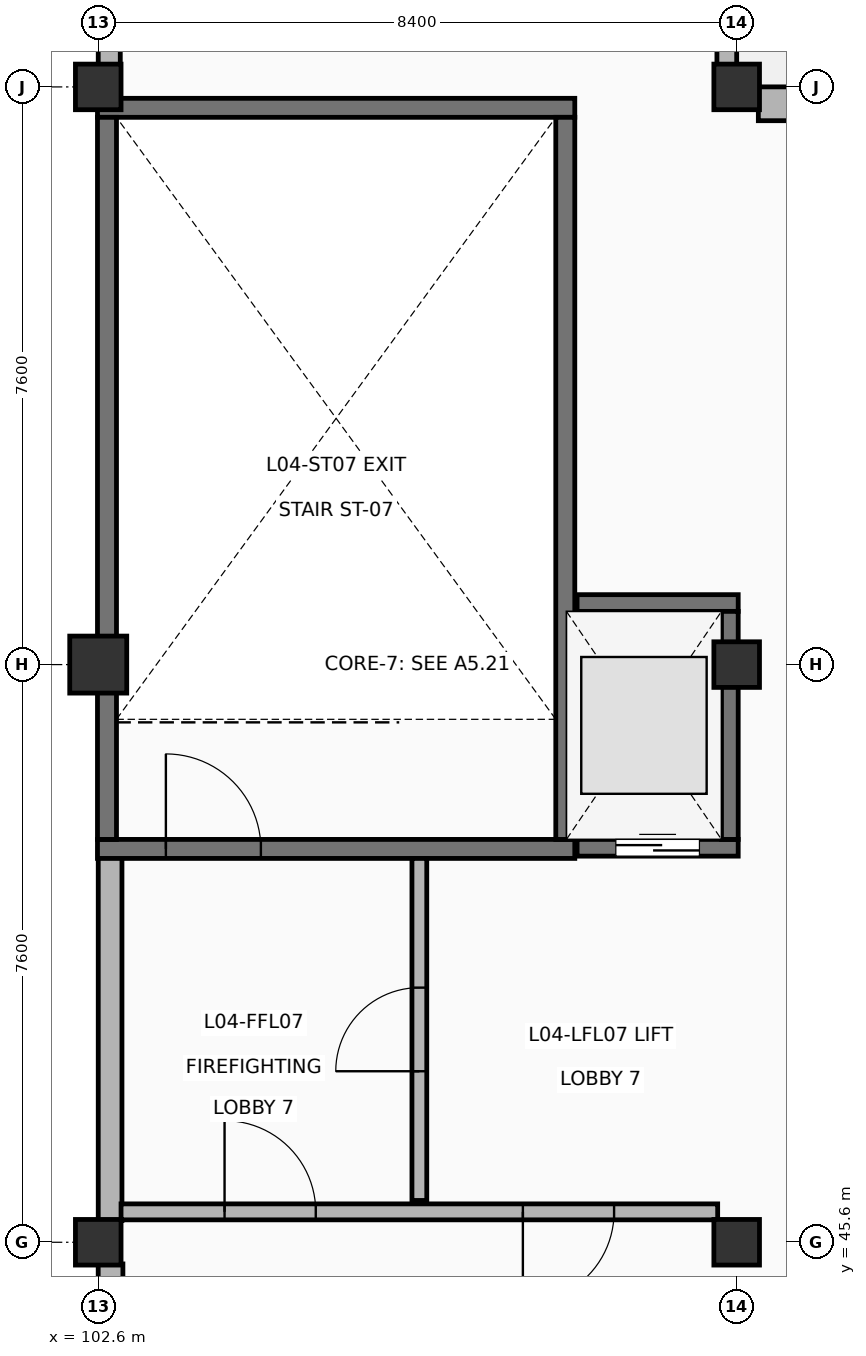
"""IFC4 building model, lengths in metres.
Left out: names, types, materials, properties, quantities, classifications, styles, units other than length and angle.
Written with IfcOpenShell. Run it as: python <this file> out.ifc"""

import sys

from ifc_helpers import new_model, si_unit, direction, frame, frame_2d, origin, origin_2d, place, context, subcontext, project, spatial, rectangle, circle, extrude, element, fill, save


model = new_model("IFC4")
c1 = context("Model", 3, precision=1e-05, world=origin(), true_north=direction((0.0, 1.0)))
c2 = subcontext(c1, "Body", "Model", "MODEL_VIEW")
j1 = project(units=[si_unit("LENGTHUNIT", "METRE"), si_unit("PLANEANGLEUNIT", "RADIAN")], contexts=[c1])
p1 = place(None, origin())
s1 = spatial("IfcSite", under=j1, at=p1, CompositionType="ELEMENT")
p2 = place(p1, origin())
s2 = spatial("IfcBuilding", under=s1, at=p2, CompositionType="ELEMENT")
p3 = place(p2, frame((0.0, 0.0, 15.3)))
s3 = spatial("IfcBuildingStorey", under=s2, at=p3, CompositionType="ELEMENT", Elevation=15.3)
p4 = place(p3, frame((102.6, 45.6, 0.0), z_axis=(0.0, 0.0, 1.0), x_axis=(1.0, 0.0, 0.0)))
e1 = element("IfcColumn", 1, at=p4, inside=s3, PredefinedType="COLUMN", context=c2, shape_type="SweptSolid", body=[
    extrude(rectangle(XDim=0.6, YDim=0.6, at=origin_2d()), origin(), (0.0, 0.0, 1.0), 4.285),
])
p5 = place(p3, frame((102.6, 53.2, 0.0), z_axis=(0.0, 0.0, 1.0), x_axis=(1.0, 0.0, 0.0)))
e2 = element("IfcColumn", 2, at=p5, inside=s3, PredefinedType="COLUMN", context=c2, shape_type="SweptSolid", body=[
    extrude(circle(Radius=0.375, at=origin_2d()), origin(), (0.0, 0.0, 1.0), 4.285),
])
for number, where, z_axis, x_axis in (
    (3, (102.6, 60.8, 0.0), (0.0, 0.0, 1.0), (1.0, 0.0, 0.0)),
    (4, (111.0, 45.6, 0.0), (0.0, 0.0, 1.0), (1.0, 0.0, 0.0)),
    (5, (111.0, 53.2, 0.0), (0.0, 0.0, 1.0), (1.0, 0.0, 0.0)),
    (6, (111.0, 60.8, 0.0), (0.0, 0.0, 1.0), (1.0, 0.0, 0.0)),
):
    element("IfcColumn", number, at=place(p3, frame(where, z_axis=z_axis, x_axis=x_axis)), inside=s3, PredefinedType="COLUMN", context=c2, shape_type="SweptSolid", body=[
        extrude(rectangle(XDim=0.6, YDim=0.6, at=origin_2d()), origin(), (0.0, 0.0, 1.0), 4.285),
    ])
p6 = place(p3, frame((102.762, 38.345, 0.0), z_axis=(0.0, 0.0, 1.0), x_axis=(0.0, 1.0, 0.0)))
e7 = element("IfcWall", 7, at=p6, inside=s3, PredefinedType="SOLIDWALL", context=c2, shape_type="SweptSolid", body=[
    extrude(rectangle(XDim=6.97, YDim=0.325, at=frame_2d((3.485, 0.0))), origin(), (0.0, 0.0, 1.0), 4.26),
])
p7 = place(p3, frame((102.756, 45.885, 0.0), z_axis=(0.0, 0.0, 1.0), x_axis=(0.0, 1.0, 0.0)))
e8 = element("IfcWall", 8, at=p7, inside=s3, PredefinedType="SOLIDWALL", context=c2, shape_type="SweptSolid", body=[
    extrude(rectangle(XDim=4.895, YDim=0.312, at=frame_2d((2.448, 0.0))), origin(), (0.0, 0.0, 1.0), 4.26),
])
p8 = place(p3, frame((102.745, 61.085, 0.0), z_axis=(0.0, 0.0, 1.0), x_axis=(0.0, 1.0, 0.0)))
e9 = element("IfcWall", 9, at=p8, inside=s3, PredefinedType="SOLIDWALL", context=c2, shape_type="SweptSolid", body=[
    extrude(rectangle(XDim=7.03, YDim=0.29, at=frame_2d((3.515, 0.0))), origin(), (0.0, 0.0, 1.0), 4.26),
])
p9 = place(p3, frame((110.87, 68.115, 0.0), z_axis=(0.0, 0.0, 1.0), x_axis=(0.0, -1.0, 0.0)))
e10 = element("IfcWall", 10, at=p9, inside=s3, PredefinedType="SOLIDWALL", context=c2, shape_type="SweptSolid", body=[
    extrude(rectangle(XDim=7.03, YDim=0.26, at=frame_2d((3.515, 0.0))), origin(), (0.0, 0.0, 1.0), 4.26),
])
p10 = place(p9, frame((2.615, 0.0, 0.0)))
e11 = element("IfcOpeningElement", 11, at=p10, cuts=e10, PredefinedType="OPENING", context=c2, shape_type="SweptSolid", body=[
    extrude(rectangle(XDim=1.8, YDim=2.3, at=frame_2d((0.9, 1.15))), frame((0.0, 0.14, 0.0), z_axis=(0.0, -1.0, 0.0), x_axis=(1.0, 0.0, 0.0)), (0.0, 0.0, 1.0), 0.28),
])
p11 = place(p3, frame((111.285, 60.578, 0.0), z_axis=(0.0, 0.0, 1.0), x_axis=(1.0, 0.0, 0.0)))
e12 = element("IfcWall", 12, at=p11, inside=s3, PredefinedType="SOLIDWALL", context=c2, shape_type="SweptSolid", body=[
    extrude(rectangle(XDim=6.63, YDim=0.445, at=frame_2d((3.315, 0.0))), origin(), (0.0, 0.0, 1.0), 4.26),
])
p12 = place(p3, frame((102.59, 50.775, 0.0), z_axis=(0.0, 0.0, 1.0), x_axis=(1.0, 0.0, 0.0)))
e13 = element("IfcWall", 13, at=p12, inside=s3, PredefinedType="SHEAR", context=c2, shape_type="SweptSolid", body=[
    extrude(rectangle(XDim=6.28, YDim=0.25, at=frame_2d((3.14, 0.0))), origin(), (0.0, 0.0, 1.0), 4.28),
])
p13 = place(p12, frame((0.9, 0.0, 0.0)))
e14 = element("IfcOpeningElement", 14, at=p13, cuts=e13, PredefinedType="OPENING", context=c2, shape_type="SweptSolid", body=[
    extrude(rectangle(XDim=1.25, YDim=2.2, at=frame_2d((0.625, 1.1))), frame((0.0, 0.135, 0.0), z_axis=(0.0, -1.0, 0.0), x_axis=(1.0, 0.0, 0.0)), (0.0, 0.0, 1.0), 0.27),
])
p14 = place(p3, frame((102.59, 60.525, 0.0), z_axis=(0.0, 0.0, 1.0), x_axis=(1.0, 0.0, 0.0)))
e15 = element("IfcWall", 15, at=p14, inside=s3, PredefinedType="SHEAR", context=c2, shape_type="SweptSolid", body=[
    extrude(rectangle(XDim=6.28, YDim=0.25, at=frame_2d((3.14, 0.0))), origin(), (0.0, 0.0, 1.0), 4.28),
])
for number, where, z_axis, x_axis in (
    (16, (102.715, 50.9, 0.0), (0.0, 0.0, 1.0), (0.0, 1.0, 0.0)),
    (17, (108.745, 50.9, 0.0), (0.0, 0.0, 1.0), (0.0, 1.0, 0.0)),
):
    element("IfcWall", number, at=place(p3, frame(where, z_axis=z_axis, x_axis=x_axis)), inside=s3, PredefinedType="SHEAR", context=c2, shape_type="SweptSolid", body=[
        extrude(rectangle(XDim=9.5, YDim=0.25, at=frame_2d((4.75, 0.0))), origin(), (0.0, 0.0, 1.0), 4.28),
    ])
p15 = place(p3, frame((108.9, 50.79, 0.0), z_axis=(0.0, 0.0, 1.0), x_axis=(1.0, 0.0, 0.0)))
e18 = element("IfcWall", 18, at=p15, inside=s3, PredefinedType="SHEAR", context=c2, shape_type="SweptSolid", body=[
    extrude(rectangle(XDim=2.12, YDim=0.22, at=frame_2d((1.06, 0.0))), origin(), (0.0, 0.0, 1.0), 4.28),
])
p16 = place(p15, frame((0.51, 0.0, 0.0)))
e19 = element("IfcOpeningElement", 19, at=p16, cuts=e18, PredefinedType="OPENING", context=c2, shape_type="SweptSolid", body=[
    extrude(rectangle(XDim=1.1, YDim=2.15, at=frame_2d((0.55, 1.075))), frame((0.0, 0.12, 0.0), z_axis=(0.0, -1.0, 0.0), x_axis=(1.0, 0.0, 0.0)), (0.0, 0.0, 1.0), 0.24),
])
p17 = place(p3, frame((108.9, 54.01, 0.0), z_axis=(0.0, 0.0, 1.0), x_axis=(1.0, 0.0, 0.0)))
e20 = element("IfcWall", 20, at=p17, inside=s3, PredefinedType="SHEAR", context=c2, shape_type="SweptSolid", body=[
    extrude(rectangle(XDim=2.12, YDim=0.22, at=frame_2d((1.06, 0.0))), origin(), (0.0, 0.0, 1.0), 4.28),
])
p18 = place(p3, frame((110.91, 50.9, 0.0), z_axis=(0.0, 0.0, 1.0), x_axis=(0.0, 1.0, 0.0)))
e21 = element("IfcWall", 21, at=p18, inside=s3, PredefinedType="SHEAR", context=c2, shape_type="SweptSolid", body=[
    extrude(rectangle(XDim=3.0, YDim=0.22, at=frame_2d((1.5, 0.0))), origin(), (0.0, 0.0, 1.0), 4.28),
])
p19 = place(p3, frame((102.9, 46.0, 0.0), z_axis=(0.0, 0.0, 1.0), x_axis=(1.0, 0.0, 0.0)))
e22 = element("IfcWall", 22, at=p19, inside=s3, PredefinedType="PARTITIONING", context=c2, shape_type="SweptSolid", body=[
    extrude(rectangle(XDim=7.85, YDim=0.21, at=frame_2d((3.925, 0.0))), origin(), (0.0, 0.0, 1.0), 4.28),
])
p20 = place(p19, frame((1.362, 0.0, 0.0)))
e23 = element("IfcOpeningElement", 23, at=p20, cuts=e22, PredefinedType="OPENING", context=c2, shape_type="SweptSolid", body=[
    extrude(rectangle(XDim=1.2, YDim=2.2, at=frame_2d((0.6, 1.1))), frame((0.0, 0.115, 0.0), z_axis=(0.0, -1.0, 0.0), x_axis=(1.0, 0.0, 0.0)), (0.0, 0.0, 1.0), 0.23),
])
p21 = place(p19, frame((5.287, 0.0, 0.0)))
e24 = element("IfcOpeningElement", 24, at=p21, cuts=e22, PredefinedType="OPENING", context=c2, shape_type="SweptSolid", body=[
    extrude(rectangle(XDim=1.2, YDim=2.2, at=frame_2d((0.6, 1.1))), frame((0.0, 0.115, 0.0), z_axis=(0.0, -1.0, 0.0), x_axis=(1.0, 0.0, 0.0)), (0.0, 0.0, 1.0), 0.23),
])
p22 = place(p3, frame((106.825, 46.15, 0.0), z_axis=(0.0, 0.0, 1.0), x_axis=(0.0, 1.0, 0.0)))
e25 = element("IfcWall", 25, at=p22, inside=s3, PredefinedType="PARTITIONING", context=c2, shape_type="SweptSolid", body=[
    extrude(rectangle(XDim=4.5, YDim=0.195, at=frame_2d((2.25, 0.0))), origin(), (0.0, 0.0, 1.0), 4.28),
])
p23 = place(p22, frame((1.7, 0.0, 0.0)))
e26 = element("IfcOpeningElement", 26, at=p23, cuts=e25, PredefinedType="OPENING", context=c2, shape_type="SweptSolid", body=[
    extrude(rectangle(XDim=1.1, YDim=2.15, at=frame_2d((0.55, 1.075))), frame((0.0, 0.107, 0.0), z_axis=(0.0, -1.0, 0.0), x_axis=(1.0, 0.0, 0.0)), (0.0, 0.0, 1.0), 0.215),
])
p24 = place(p13, origin())
e27 = element("IfcDoor", 27, at=p24, inside=s3, OperationType="SINGLE_SWING_LEFT", PredefinedType="DOOR", context=c2, shape_type="SweptSolid", body=[
    extrude(rectangle(XDim=1.25, YDim=2.2, at=frame_2d((0.625, 1.1))), frame((0.0, 0.025, 0.0), z_axis=(0.0, -1.0, 0.0), x_axis=(1.0, 0.0, 0.0)), (0.0, 0.0, 1.0), 0.05),
])
fill(e14, e27)
p25 = place(p16, origin())
e28 = element("IfcDoor", 28, at=p25, inside=s3, OperationType="DOUBLE_DOOR_SLIDING", PredefinedType="DOOR", context=c2, shape_type="SweptSolid", body=[
    extrude(rectangle(XDim=1.1, YDim=2.15, at=frame_2d((0.55, 1.075))), frame((0.0, 0.025, 0.0), z_axis=(0.0, -1.0, 0.0), x_axis=(1.0, 0.0, 0.0)), (0.0, 0.0, 1.0), 0.05),
])
fill(e19, e28)
p26 = place(p20, origin())
e29 = element("IfcDoor", 29, at=p26, inside=s3, OperationType="SINGLE_SWING_LEFT", PredefinedType="DOOR", context=c2, shape_type="SweptSolid", body=[
    extrude(rectangle(XDim=1.2, YDim=2.2, at=frame_2d((0.6, 1.1))), frame((0.0, 0.025, 0.0), z_axis=(0.0, -1.0, 0.0), x_axis=(1.0, 0.0, 0.0)), (0.0, 0.0, 1.0), 0.05),
])
fill(e23, e29)
p27 = place(p21, origin())
e30 = element("IfcDoor", 30, at=p27, inside=s3, OperationType="SINGLE_SWING_RIGHT", PredefinedType="DOOR", context=c2, shape_type="SweptSolid", body=[
    extrude(rectangle(XDim=1.2, YDim=2.2, at=frame_2d((0.6, 1.1))), frame((0.0, 0.025, 0.0), z_axis=(0.0, -1.0, 0.0), x_axis=(1.0, 0.0, 0.0)), (0.0, 0.0, 1.0), 0.05),
])
fill(e24, e30)
p28 = place(p23, origin())
e31 = element("IfcDoor", 31, at=p28, inside=s3, OperationType="SINGLE_SWING_LEFT", PredefinedType="DOOR", context=c2, shape_type="SweptSolid", body=[
    extrude(rectangle(XDim=1.1, YDim=2.15, at=frame_2d((0.55, 1.075))), frame((0.0, 0.025, 0.0), z_axis=(0.0, -1.0, 0.0), x_axis=(1.0, 0.0, 0.0)), (0.0, 0.0, 1.0), 0.05),
])
fill(e26, e31)
save(model, sys.argv[1])
